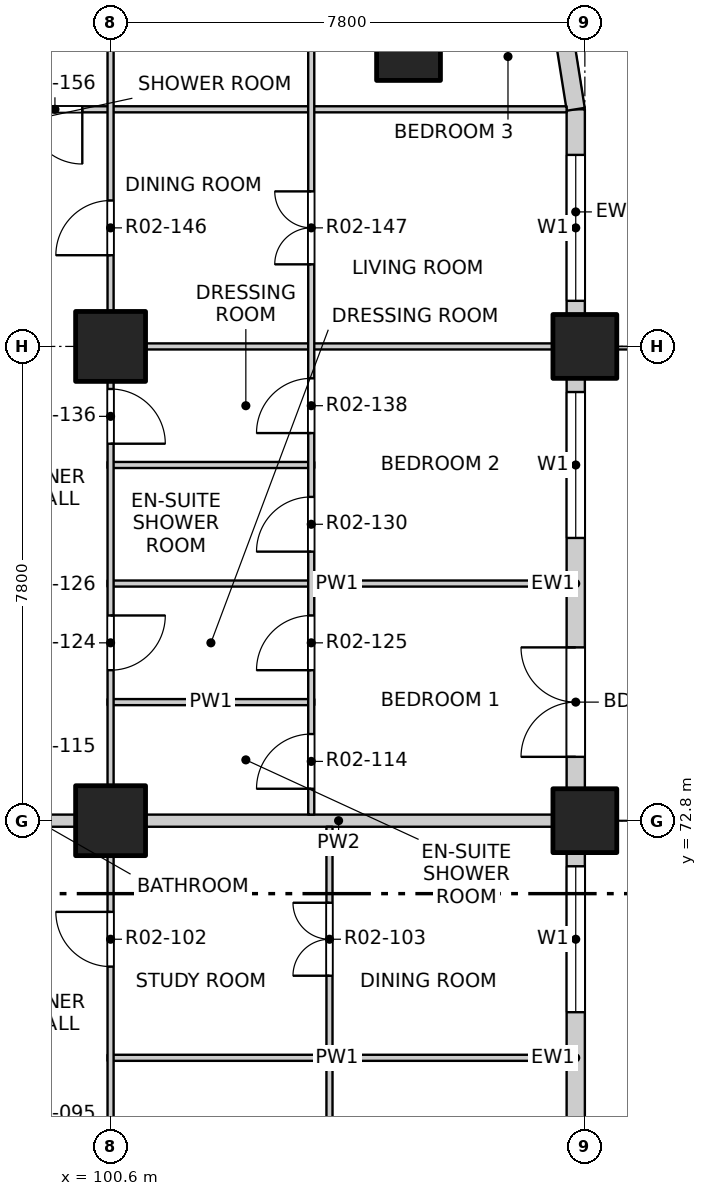
"""IFC4 building model, lengths in metres.
Left out: names, types, materials, properties, quantities, classifications, styles, units other than length and angle.
Written with IfcOpenShell. Run it as: python <this file> out.ifc"""

import sys

from ifc_helpers import new_model, si_unit, direction, frame, frame_2d, origin, origin_2d, place, context, subcontext, project, spatial, rectangle, extrude, element, fill, save


model = new_model("IFC4")
c1 = context("Model", 3, precision=1e-05, world=origin(), true_north=direction((0.0, 1.0)))
c2 = subcontext(c1, "Body", "Model", "MODEL_VIEW")
j1 = project(units=[si_unit("LENGTHUNIT", "METRE"), si_unit("PLANEANGLEUNIT", "RADIAN")], contexts=[c1])
p1 = place(None, origin())
s1 = spatial("IfcSite", under=j1, at=p1, CompositionType="ELEMENT")
p2 = place(p1, origin())
s2 = spatial("IfcBuilding", under=s1, at=p2, CompositionType="ELEMENT")
p3 = place(p2, frame((0.0, 0.0, 29.7)))
s3 = spatial("IfcBuildingStorey", under=s2, at=p3, CompositionType="ELEMENT", Elevation=29.7)
for number, where, z_axis, x_axis in (
    (1, (105.5, 85.5, -0.25), (0.0, 0.0, 1.0), (1.0, 0.0, 0.0)),
    (2, (108.4, 72.8, -0.25), (0.0, 0.0, 1.0), (1.0, 0.0, 0.0)),
    (3, (108.4, 80.6, -0.25), (0.0, 0.0, 1.0), (1.0, 0.0, 0.0)),
):
    element("IfcColumn", number, at=place(p3, frame(where, z_axis=z_axis, x_axis=x_axis)), inside=s3, PredefinedType="COLUMN", context=c2, shape_type="SweptSolid", body=[
        extrude(rectangle(XDim=1.05, YDim=1.05, at=origin_2d()), origin(), (0.0, 0.0, 1.0), 3.4),
    ])
for number, where, z_axis, x_axis in (
    (4, (100.6, 72.8, -0.25), (0.0, 0.0, 1.0), (1.0, 0.0, 0.0)),
    (5, (100.6, 80.6, -0.25), (0.0, 0.0, 1.0), (1.0, 0.0, 0.0)),
):
    element("IfcColumn", number, at=place(p3, frame(where, z_axis=z_axis, x_axis=x_axis)), inside=s3, PredefinedType="COLUMN", context=c2, shape_type="SweptSolid", body=[
        extrude(rectangle(XDim=1.15, YDim=1.15, at=origin_2d()), origin(), (0.0, 0.0, 1.0), 3.4),
    ])
p4 = place(p3, frame((108.25, 65.525, 0.0), z_axis=(0.0, 0.0, 1.0), x_axis=(0.0, 1.0, 0.0)))
e6 = element("IfcWall", 6, at=p4, inside=s3, PredefinedType="SOLIDWALL", context=c2, shape_type="SweptSolid", body=[
    extrude(rectangle(XDim=6.75, YDim=0.3, at=frame_2d((3.375, 0.0))), origin(), (0.0, 0.0, 1.0), 2.7),
])
p5 = place(p4, frame((0.525, 0.0, 0.0)))
e7 = element("IfcOpeningElement", 7, at=p5, cuts=e6, PredefinedType="OPENING", context=c2, shape_type="SweptSolid", body=[
    extrude(rectangle(XDim=1.8, YDim=2.4, at=frame_2d((0.9, 1.2))), frame((0.0, 0.16, 0.0), z_axis=(0.0, -1.0, 0.0), x_axis=(1.0, 0.0, 0.0)), (0.0, 0.0, 1.0), 0.32),
])
p6 = place(p4, frame((4.125, 0.0, 0.9)))
e8 = element("IfcOpeningElement", 8, at=p6, cuts=e6, PredefinedType="OPENING", context=c2, shape_type="SweptSolid", body=[
    extrude(rectangle(XDim=2.4, YDim=1.8, at=frame_2d((1.2, 0.9))), frame((0.0, 0.16, 0.0), z_axis=(0.0, -1.0, 0.0), x_axis=(1.0, 0.0, 0.0)), (0.0, 0.0, 1.0), 0.32),
])
p7 = place(p3, frame((108.25, 73.325, 0.0), z_axis=(0.0, 0.0, 1.0), x_axis=(0.0, 1.0, 0.0)))
e9 = element("IfcWall", 9, at=p7, inside=s3, PredefinedType="SOLIDWALL", context=c2, shape_type="SweptSolid", body=[
    extrude(rectangle(XDim=6.75, YDim=0.3, at=frame_2d((3.375, 0.0))), origin(), (0.0, 0.0, 1.0), 2.7),
])
p8 = place(p7, frame((0.525, 0.0, 0.0)))
e10 = element("IfcOpeningElement", 10, at=p8, cuts=e9, PredefinedType="OPENING", context=c2, shape_type="SweptSolid", body=[
    extrude(rectangle(XDim=1.8, YDim=2.4, at=frame_2d((0.9, 1.2))), frame((0.0, 0.16, 0.0), z_axis=(0.0, -1.0, 0.0), x_axis=(1.0, 0.0, 0.0)), (0.0, 0.0, 1.0), 0.32),
])
p9 = place(p7, frame((4.125, 0.0, 0.9)))
e11 = element("IfcOpeningElement", 11, at=p9, cuts=e9, PredefinedType="OPENING", context=c2, shape_type="SweptSolid", body=[
    extrude(rectangle(XDim=2.4, YDim=1.8, at=frame_2d((1.2, 0.9))), frame((0.0, 0.16, 0.0), z_axis=(0.0, -1.0, 0.0), x_axis=(1.0, 0.0, 0.0)), (0.0, 0.0, 1.0), 0.32),
])
p10 = place(p3, frame((108.25, 81.125, 0.0), z_axis=(0.0, 0.0, 1.0), x_axis=(0.0, 1.0, 0.0)))
e12 = element("IfcWall", 12, at=p10, inside=s3, PredefinedType="SOLIDWALL", context=c2, shape_type="SweptSolid", body=[
    extrude(rectangle(XDim=3.375, YDim=0.3, at=frame_2d((1.688, 0.0))), origin(), (0.0, 0.0, 1.0), 2.7),
])
p11 = place(p10, frame((0.225, 0.0, 0.9)))
e13 = element("IfcOpeningElement", 13, at=p11, cuts=e12, PredefinedType="OPENING", context=c2, shape_type="SweptSolid", body=[
    extrude(rectangle(XDim=2.4, YDim=1.8, at=frame_2d((1.2, 0.9))), frame((0.0, 0.16, 0.0), z_axis=(0.0, -1.0, 0.0), x_axis=(1.0, 0.0, 0.0)), (0.0, 0.0, 1.0), 0.32),
])
p12 = place(p3, frame((108.25, 84.5, 0.0), z_axis=(0.0, 0.0, 1.0), x_axis=(-0.156496880861, 0.987678452879, 0.0)))
e14 = element("IfcWall", 14, at=p12, inside=s3, PredefinedType="SOLIDWALL", context=c2, shape_type="SweptSolid", body=[
    extrude(rectangle(XDim=1.173, YDim=0.3, at=frame_2d((0.586, 0.0))), origin(), (0.0, 0.0, 1.0), 2.7),
])
p13 = place(p3, frame((100.55, 68.9, 0.0), z_axis=(0.0, 0.0, 1.0), x_axis=(1.0, 0.0, 0.0)))
e15 = element("IfcWall", 15, at=p13, inside=s3, PredefinedType="PARTITIONING", context=c2, shape_type="SweptSolid", body=[
    extrude(rectangle(XDim=7.55, YDim=0.1, at=frame_2d((3.775, 0.0))), origin(), (0.0, 0.0, 1.0), 3.15),
])
p14 = place(p3, frame((96.6, 72.8, 0.0), z_axis=(0.0, 0.0, 1.0), x_axis=(1.0, 0.0, 0.0)))
e16 = element("IfcWall", 16, at=p14, inside=s3, PredefinedType="PARTITIONING", context=c2, shape_type="SweptSolid", body=[
    extrude(rectangle(XDim=4.0, YDim=0.2, at=frame_2d((2.0, 0.0))), origin(), (0.0, 0.0, 1.0), 3.15),
])
p15 = place(p3, frame((100.6, 72.8, 0.0), z_axis=(0.0, 0.0, 1.0), x_axis=(1.0, 0.0, 0.0)))
e17 = element("IfcWall", 17, at=p15, inside=s3, PredefinedType="PARTITIONING", context=c2, shape_type="SweptSolid", body=[
    extrude(rectangle(XDim=7.5, YDim=0.2, at=frame_2d((3.75, 0.0))), origin(), (0.0, 0.0, 1.0), 2.55),
])
p16 = place(p3, frame((100.55, 74.75, 0.0), z_axis=(0.0, 0.0, 1.0), x_axis=(1.0, 0.0, 0.0)))
e18 = element("IfcWall", 18, at=p16, inside=s3, PredefinedType="PARTITIONING", context=c2, shape_type="SweptSolid", body=[
    extrude(rectangle(XDim=3.4, YDim=0.1, at=frame_2d((1.7, 0.0))), origin(), (0.0, 0.0, 1.0), 3.15),
])
p17 = place(p3, frame((100.55, 76.7, 0.0), z_axis=(0.0, 0.0, 1.0), x_axis=(1.0, 0.0, 0.0)))
e19 = element("IfcWall", 19, at=p17, inside=s3, PredefinedType="PARTITIONING", context=c2, shape_type="SweptSolid", body=[
    extrude(rectangle(XDim=7.55, YDim=0.1, at=frame_2d((3.775, 0.0))), origin(), (0.0, 0.0, 1.0), 3.15),
])
p18 = place(p3, frame((100.55, 78.65, 0.0), z_axis=(0.0, 0.0, 1.0), x_axis=(1.0, 0.0, 0.0)))
e20 = element("IfcWall", 20, at=p18, inside=s3, PredefinedType="PARTITIONING", context=c2, shape_type="SweptSolid", body=[
    extrude(rectangle(XDim=3.4, YDim=0.1, at=frame_2d((1.7, 0.0))), origin(), (0.0, 0.0, 1.0), 3.15),
])
p19 = place(p3, frame((100.55, 80.6, 0.0), z_axis=(0.0, 0.0, 1.0), x_axis=(1.0, 0.0, 0.0)))
e21 = element("IfcWall", 21, at=p19, inside=s3, PredefinedType="PARTITIONING", context=c2, shape_type="SweptSolid", body=[
    extrude(rectangle(XDim=7.55, YDim=0.1, at=frame_2d((3.775, 0.0))), origin(), (0.0, 0.0, 1.0), 2.55),
])
p20 = place(p3, frame((96.6, 84.5, 0.0), z_axis=(0.0, 0.0, 1.0), x_axis=(1.0, 0.0, 0.0)))
e22 = element("IfcWall", 22, at=p20, inside=s3, PredefinedType="PARTITIONING", context=c2, shape_type="SweptSolid", body=[
    extrude(rectangle(XDim=11.5, YDim=0.1, at=frame_2d((5.75, 0.0))), origin(), (0.0, 0.0, 1.0), 3.15),
])
p21 = place(p20, frame((2.635, 0.0, 0.0)))
e23 = element("IfcOpeningElement", 23, at=p21, cuts=e22, PredefinedType="OPENING", context=c2, shape_type="SweptSolid", body=[
    extrude(rectangle(XDim=0.9, YDim=2.1, at=frame_2d((0.45, 1.05))), frame((0.0, 0.06, 0.0), z_axis=(0.0, -1.0, 0.0), x_axis=(1.0, 0.0, 0.0)), (0.0, 0.0, 1.0), 0.12),
])
p22 = place(p3, frame((100.6, 49.4, 0.0), z_axis=(0.0, 0.0, 1.0), x_axis=(0.0, 1.0, 0.0)))
e24 = element("IfcWall", 24, at=p22, inside=s3, PredefinedType="PARTITIONING", context=c2, shape_type="SweptSolid", body=[
    extrude(rectangle(XDim=31.2, YDim=0.1, at=frame_2d((15.6, 0.0))), origin(), (0.0, 0.0, 1.0), 3.15),
])
p23 = place(p22, frame((2.475, 0.0, 0.0)))
e25 = element("IfcOpeningElement", 25, at=p23, cuts=e24, PredefinedType="OPENING", context=c2, shape_type="SweptSolid", body=[
    extrude(rectangle(XDim=0.9, YDim=2.1, at=frame_2d((0.45, 1.05))), frame((0.0, 0.06, 0.0), z_axis=(0.0, -1.0, 0.0), x_axis=(1.0, 0.0, 0.0)), (0.0, 0.0, 1.0), 0.12),
])
p24 = place(p22, frame((5.4, 0.0, 0.0)))
e26 = element("IfcOpeningElement", 26, at=p24, cuts=e24, PredefinedType="OPENING", context=c2, shape_type="SweptSolid", body=[
    extrude(rectangle(XDim=0.9, YDim=2.1, at=frame_2d((0.45, 1.05))), frame((0.0, 0.06, 0.0), z_axis=(0.0, -1.0, 0.0), x_axis=(1.0, 0.0, 0.0)), (0.0, 0.0, 1.0), 0.12),
])
p25 = place(p22, frame((10.275, 0.0, 0.0)))
e27 = element("IfcOpeningElement", 27, at=p25, cuts=e24, PredefinedType="OPENING", context=c2, shape_type="SweptSolid", body=[
    extrude(rectangle(XDim=0.9, YDim=2.1, at=frame_2d((0.45, 1.05))), frame((0.0, 0.06, 0.0), z_axis=(0.0, -1.0, 0.0), x_axis=(1.0, 0.0, 0.0)), (0.0, 0.0, 1.0), 0.12),
])
p26 = place(p22, frame((14.0, 0.0, 0.0)))
e28 = element("IfcOpeningElement", 28, at=p26, cuts=e24, PredefinedType="OPENING", context=c2, shape_type="SweptSolid", body=[
    extrude(rectangle(XDim=0.9, YDim=2.1, at=frame_2d((0.45, 1.05))), frame((0.0, 0.06, 0.0), z_axis=(0.0, -1.0, 0.0), x_axis=(1.0, 0.0, 0.0)), (0.0, 0.0, 1.0), 0.12),
])
p27 = place(p22, frame((17.1, 0.0, 0.0)))
e29 = element("IfcOpeningElement", 29, at=p27, cuts=e24, PredefinedType="OPENING", context=c2, shape_type="SweptSolid", body=[
    extrude(rectangle(XDim=0.9, YDim=2.1, at=frame_2d((0.45, 1.05))), frame((0.0, 0.06, 0.0), z_axis=(0.0, -1.0, 0.0), x_axis=(1.0, 0.0, 0.0)), (0.0, 0.0, 1.0), 0.12),
])
p28 = place(p22, frame((21.0, 0.0, 0.0)))
e30 = element("IfcOpeningElement", 30, at=p28, cuts=e24, PredefinedType="OPENING", context=c2, shape_type="SweptSolid", body=[
    extrude(rectangle(XDim=0.9, YDim=2.1, at=frame_2d((0.45, 1.05))), frame((0.0, 0.06, 0.0), z_axis=(0.0, -1.0, 0.0), x_axis=(1.0, 0.0, 0.0)), (0.0, 0.0, 1.0), 0.12),
])
p29 = place(p22, frame((25.875, 0.0, 0.0)))
e31 = element("IfcOpeningElement", 31, at=p29, cuts=e24, PredefinedType="OPENING", context=c2, shape_type="SweptSolid", body=[
    extrude(rectangle(XDim=0.9, YDim=2.1, at=frame_2d((0.45, 1.05))), frame((0.0, 0.06, 0.0), z_axis=(0.0, -1.0, 0.0), x_axis=(1.0, 0.0, 0.0)), (0.0, 0.0, 1.0), 0.12),
])
p30 = place(p22, frame((29.6, 0.0, 0.0)))
e32 = element("IfcOpeningElement", 32, at=p30, cuts=e24, PredefinedType="OPENING", context=c2, shape_type="SweptSolid", body=[
    extrude(rectangle(XDim=0.9, YDim=2.1, at=frame_2d((0.45, 1.05))), frame((0.0, 0.06, 0.0), z_axis=(0.0, -1.0, 0.0), x_axis=(1.0, 0.0, 0.0)), (0.0, 0.0, 1.0), 0.12),
])
p31 = place(p3, frame((100.6, 80.6, 0.0), z_axis=(0.0, 0.0, 1.0), x_axis=(0.0, 1.0, 0.0)))
e33 = element("IfcWall", 33, at=p31, inside=s3, PredefinedType="PARTITIONING", context=c2, shape_type="SweptSolid", body=[
    extrude(rectangle(XDim=7.5, YDim=0.1, at=frame_2d((3.75, 0.0))), origin(), (0.0, 0.0, 1.0), 2.55),
])
p32 = place(p31, frame((1.5, 0.0, 0.0)))
e34 = element("IfcOpeningElement", 34, at=p32, cuts=e33, PredefinedType="OPENING", context=c2, shape_type="SweptSolid", body=[
    extrude(rectangle(XDim=0.9, YDim=2.1, at=frame_2d((0.45, 1.05))), frame((0.0, 0.06, 0.0), z_axis=(0.0, -1.0, 0.0), x_axis=(1.0, 0.0, 0.0)), (0.0, 0.0, 1.0), 0.12),
])
p33 = place(p31, frame((5.4, 0.0, 0.0)))
e35 = element("IfcOpeningElement", 35, at=p33, cuts=e33, PredefinedType="OPENING", context=c2, shape_type="SweptSolid", body=[
    extrude(rectangle(XDim=0.9, YDim=2.1, at=frame_2d((0.45, 1.05))), frame((0.0, 0.06, 0.0), z_axis=(0.0, -1.0, 0.0), x_axis=(1.0, 0.0, 0.0)), (0.0, 0.0, 1.0), 0.12),
])
p34 = place(p3, frame((103.9, 72.9, 0.0), z_axis=(0.0, 0.0, 1.0), x_axis=(0.0, 1.0, 0.0)))
e36 = element("IfcWall", 36, at=p34, inside=s3, PredefinedType="PARTITIONING", context=c2, shape_type="SweptSolid", body=[
    extrude(rectangle(XDim=15.2, YDim=0.1, at=frame_2d((7.6, 0.0))), origin(), (0.0, 0.0, 1.0), 3.15),
])
p35 = place(p34, frame((0.425, 0.0, 0.0)))
e37 = element("IfcOpeningElement", 37, at=p35, cuts=e36, PredefinedType="OPENING", context=c2, shape_type="SweptSolid", body=[
    extrude(rectangle(XDim=0.9, YDim=2.1, at=frame_2d((0.45, 1.05))), frame((0.0, 0.06, 0.0), z_axis=(0.0, -1.0, 0.0), x_axis=(1.0, 0.0, 0.0)), (0.0, 0.0, 1.0), 0.12),
])
p36 = place(p34, frame((2.375, 0.0, 0.0)))
e38 = element("IfcOpeningElement", 38, at=p36, cuts=e36, PredefinedType="OPENING", context=c2, shape_type="SweptSolid", body=[
    extrude(rectangle(XDim=0.9, YDim=2.1, at=frame_2d((0.45, 1.05))), frame((0.0, 0.06, 0.0), z_axis=(0.0, -1.0, 0.0), x_axis=(1.0, 0.0, 0.0)), (0.0, 0.0, 1.0), 0.12),
])
p37 = place(p34, frame((4.325, 0.0, 0.0)))
e39 = element("IfcOpeningElement", 39, at=p37, cuts=e36, PredefinedType="OPENING", context=c2, shape_type="SweptSolid", body=[
    extrude(rectangle(XDim=0.9, YDim=2.1, at=frame_2d((0.45, 1.05))), frame((0.0, 0.06, 0.0), z_axis=(0.0, -1.0, 0.0), x_axis=(1.0, 0.0, 0.0)), (0.0, 0.0, 1.0), 0.12),
])
p38 = place(p34, frame((6.275, 0.0, 0.0)))
e40 = element("IfcOpeningElement", 40, at=p38, cuts=e36, PredefinedType="OPENING", context=c2, shape_type="SweptSolid", body=[
    extrude(rectangle(XDim=0.9, YDim=2.1, at=frame_2d((0.45, 1.05))), frame((0.0, 0.06, 0.0), z_axis=(0.0, -1.0, 0.0), x_axis=(1.0, 0.0, 0.0)), (0.0, 0.0, 1.0), 0.12),
])
p39 = place(p34, frame((9.05, 0.0, 0.0)))
e41 = element("IfcOpeningElement", 41, at=p39, cuts=e36, PredefinedType="OPENING", context=c2, shape_type="SweptSolid", body=[
    extrude(rectangle(XDim=1.2, YDim=2.1, at=frame_2d((0.6, 1.05))), frame((0.0, 0.06, 0.0), z_axis=(0.0, -1.0, 0.0), x_axis=(1.0, 0.0, 0.0)), (0.0, 0.0, 1.0), 0.12),
])
p40 = place(p34, frame((12.95, 0.0, 0.0)))
e42 = element("IfcOpeningElement", 42, at=p40, cuts=e36, PredefinedType="OPENING", context=c2, shape_type="SweptSolid", body=[
    extrude(rectangle(XDim=1.2, YDim=2.1, at=frame_2d((0.6, 1.05))), frame((0.0, 0.06, 0.0), z_axis=(0.0, -1.0, 0.0), x_axis=(1.0, 0.0, 0.0)), (0.0, 0.0, 1.0), 0.12),
])
p41 = place(p3, frame((104.2, 61.2, 0.0), z_axis=(0.0, 0.0, 1.0), x_axis=(0.0, 1.0, 0.0)))
e43 = element("IfcWall", 43, at=p41, inside=s3, PredefinedType="PARTITIONING", context=c2, shape_type="SweptSolid", body=[
    extrude(rectangle(XDim=11.5, YDim=0.1, at=frame_2d((5.75, 0.0))), origin(), (0.0, 0.0, 1.0), 3.15),
])
p42 = place(p41, frame((0.425, 0.0, 0.0)))
e44 = element("IfcOpeningElement", 44, at=p42, cuts=e43, PredefinedType="OPENING", context=c2, shape_type="SweptSolid", body=[
    extrude(rectangle(XDim=0.9, YDim=2.1, at=frame_2d((0.45, 1.05))), frame((0.0, 0.06, 0.0), z_axis=(0.0, -1.0, 0.0), x_axis=(1.0, 0.0, 0.0)), (0.0, 0.0, 1.0), 0.12),
])
p43 = place(p41, frame((2.375, 0.0, 0.0)))
e45 = element("IfcOpeningElement", 45, at=p43, cuts=e43, PredefinedType="OPENING", context=c2, shape_type="SweptSolid", body=[
    extrude(rectangle(XDim=0.9, YDim=2.1, at=frame_2d((0.45, 1.05))), frame((0.0, 0.06, 0.0), z_axis=(0.0, -1.0, 0.0), x_axis=(1.0, 0.0, 0.0)), (0.0, 0.0, 1.0), 0.12),
])
p44 = place(p41, frame((5.15, 0.0, 0.0)))
e46 = element("IfcOpeningElement", 46, at=p44, cuts=e43, PredefinedType="OPENING", context=c2, shape_type="SweptSolid", body=[
    extrude(rectangle(XDim=1.2, YDim=2.1, at=frame_2d((0.6, 1.05))), frame((0.0, 0.06, 0.0), z_axis=(0.0, -1.0, 0.0), x_axis=(1.0, 0.0, 0.0)), (0.0, 0.0, 1.0), 0.12),
])
p45 = place(p41, frame((9.05, 0.0, 0.0)))
e47 = element("IfcOpeningElement", 47, at=p45, cuts=e43, PredefinedType="OPENING", context=c2, shape_type="SweptSolid", body=[
    extrude(rectangle(XDim=1.2, YDim=2.1, at=frame_2d((0.6, 1.05))), frame((0.0, 0.06, 0.0), z_axis=(0.0, -1.0, 0.0), x_axis=(1.0, 0.0, 0.0)), (0.0, 0.0, 1.0), 0.12),
])
p46 = place(p6, origin())
e48 = element("IfcWindow", 48, at=p46, inside=s3, PartitioningType="DOUBLE_PANEL_VERTICAL", PredefinedType="WINDOW", context=c2, shape_type="SweptSolid", body=[
    extrude(rectangle(XDim=2.4, YDim=1.8, at=frame_2d((1.2, 0.9))), frame((0.0, 0.03, 0.0), z_axis=(0.0, -1.0, 0.0), x_axis=(1.0, 0.0, 0.0)), (0.0, 0.0, 1.0), 0.06),
])
fill(e8, e48)
p47 = place(p8, origin())
e49 = element("IfcDoor", 49, at=p47, inside=s3, OperationType="DOUBLE_DOOR_SINGLE_SWING", PredefinedType="DOOR", context=c2, shape_type="SweptSolid", body=[
    extrude(rectangle(XDim=1.8, YDim=2.4, at=frame_2d((0.9, 1.2))), frame((0.0, 0.025, 0.0), z_axis=(0.0, -1.0, 0.0), x_axis=(1.0, 0.0, 0.0)), (0.0, 0.0, 1.0), 0.05),
])
fill(e10, e49)
p48 = place(p9, origin())
e50 = element("IfcWindow", 50, at=p48, inside=s3, PartitioningType="DOUBLE_PANEL_VERTICAL", PredefinedType="WINDOW", context=c2, shape_type="SweptSolid", body=[
    extrude(rectangle(XDim=2.4, YDim=1.8, at=frame_2d((1.2, 0.9))), frame((0.0, 0.03, 0.0), z_axis=(0.0, -1.0, 0.0), x_axis=(1.0, 0.0, 0.0)), (0.0, 0.0, 1.0), 0.06),
])
fill(e11, e50)
p49 = place(p11, origin())
e51 = element("IfcWindow", 51, at=p49, inside=s3, PartitioningType="DOUBLE_PANEL_VERTICAL", PredefinedType="WINDOW", context=c2, shape_type="SweptSolid", body=[
    extrude(rectangle(XDim=2.4, YDim=1.8, at=frame_2d((1.2, 0.9))), frame((0.0, 0.03, 0.0), z_axis=(0.0, -1.0, 0.0), x_axis=(1.0, 0.0, 0.0)), (0.0, 0.0, 1.0), 0.06),
])
fill(e13, e51)
p50 = place(p28, origin())
e52 = element("IfcDoor", 52, at=p50, inside=s3, OperationType="SINGLE_SWING_RIGHT", PredefinedType="DOOR", context=c2, shape_type="SweptSolid", body=[
    extrude(rectangle(XDim=0.9, YDim=2.1, at=frame_2d((0.45, 1.05))), frame((0.0, 0.025, 0.0), z_axis=(0.0, -1.0, 0.0), x_axis=(1.0, 0.0, 0.0)), (0.0, 0.0, 1.0), 0.05),
])
fill(e30, e52)
p51 = place(p45, origin())
e53 = element("IfcDoor", 53, at=p51, inside=s3, OperationType="DOUBLE_DOOR_SINGLE_SWING", PredefinedType="DOOR", context=c2, shape_type="SweptSolid", body=[
    extrude(rectangle(XDim=1.2, YDim=2.1, at=frame_2d((0.6, 1.05))), frame((0.0, 0.025, 0.0), z_axis=(0.0, -1.0, 0.0), x_axis=(1.0, 0.0, 0.0)), (0.0, 0.0, 1.0), 0.05),
])
fill(e47, e53)
p52 = place(p35, origin())
e54 = element("IfcDoor", 54, at=p52, inside=s3, OperationType="SINGLE_SWING_LEFT", PredefinedType="DOOR", context=c2, shape_type="SweptSolid", body=[
    extrude(rectangle(XDim=0.9, YDim=2.1, at=frame_2d((0.45, 1.05))), frame((0.0, 0.025, 0.0), z_axis=(0.0, -1.0, 0.0), x_axis=(1.0, 0.0, 0.0)), (0.0, 0.0, 1.0), 0.05),
])
fill(e37, e54)
p53 = place(p29, origin())
e55 = element("IfcDoor", 55, at=p53, inside=s3, OperationType="SINGLE_SWING_LEFT", PredefinedType="DOOR", context=c2, shape_type="SweptSolid", body=[
    extrude(rectangle(XDim=0.9, YDim=2.1, at=frame_2d((0.45, 1.05))), frame((0.0, 0.025, 0.0), z_axis=(0.0, -1.0, 0.0), x_axis=(1.0, 0.0, 0.0)), (0.0, 0.0, 1.0), 0.05),
])
fill(e31, e55)
p54 = place(p36, origin())
e56 = element("IfcDoor", 56, at=p54, inside=s3, OperationType="SINGLE_SWING_LEFT", PredefinedType="DOOR", context=c2, shape_type="SweptSolid", body=[
    extrude(rectangle(XDim=0.9, YDim=2.1, at=frame_2d((0.45, 1.05))), frame((0.0, 0.025, 0.0), z_axis=(0.0, -1.0, 0.0), x_axis=(1.0, 0.0, 0.0)), (0.0, 0.0, 1.0), 0.05),
])
fill(e38, e56)
p55 = place(p37, origin())
e57 = element("IfcDoor", 57, at=p55, inside=s3, OperationType="SINGLE_SWING_LEFT", PredefinedType="DOOR", context=c2, shape_type="SweptSolid", body=[
    extrude(rectangle(XDim=0.9, YDim=2.1, at=frame_2d((0.45, 1.05))), frame((0.0, 0.025, 0.0), z_axis=(0.0, -1.0, 0.0), x_axis=(1.0, 0.0, 0.0)), (0.0, 0.0, 1.0), 0.05),
])
fill(e39, e57)
p56 = place(p30, origin())
e58 = element("IfcDoor", 58, at=p56, inside=s3, OperationType="SINGLE_SWING_RIGHT", PredefinedType="DOOR", context=c2, shape_type="SweptSolid", body=[
    extrude(rectangle(XDim=0.9, YDim=2.1, at=frame_2d((0.45, 1.05))), frame((0.0, 0.025, 0.0), z_axis=(0.0, -1.0, 0.0), x_axis=(1.0, 0.0, 0.0)), (0.0, 0.0, 1.0), 0.05),
])
fill(e32, e58)
p57 = place(p38, origin())
e59 = element("IfcDoor", 59, at=p57, inside=s3, OperationType="SINGLE_SWING_LEFT", PredefinedType="DOOR", context=c2, shape_type="SweptSolid", body=[
    extrude(rectangle(XDim=0.9, YDim=2.1, at=frame_2d((0.45, 1.05))), frame((0.0, 0.025, 0.0), z_axis=(0.0, -1.0, 0.0), x_axis=(1.0, 0.0, 0.0)), (0.0, 0.0, 1.0), 0.05),
])
fill(e40, e59)
p58 = place(p32, origin())
e60 = element("IfcDoor", 60, at=p58, inside=s3, OperationType="SINGLE_SWING_LEFT", PredefinedType="DOOR", context=c2, shape_type="SweptSolid", body=[
    extrude(rectangle(XDim=0.9, YDim=2.1, at=frame_2d((0.45, 1.05))), frame((0.0, 0.025, 0.0), z_axis=(0.0, -1.0, 0.0), x_axis=(1.0, 0.0, 0.0)), (0.0, 0.0, 1.0), 0.05),
])
fill(e34, e60)
p59 = place(p39, origin())
e61 = element("IfcDoor", 61, at=p59, inside=s3, OperationType="DOUBLE_DOOR_SINGLE_SWING", PredefinedType="DOOR", context=c2, shape_type="SweptSolid", body=[
    extrude(rectangle(XDim=1.2, YDim=2.1, at=frame_2d((0.6, 1.05))), frame((0.0, 0.025, 0.0), z_axis=(0.0, -1.0, 0.0), x_axis=(1.0, 0.0, 0.0)), (0.0, 0.0, 1.0), 0.05),
])
fill(e41, e61)
p60 = place(p21, origin())
e62 = element("IfcDoor", 62, at=p60, inside=s3, OperationType="SINGLE_SWING_LEFT", PredefinedType="DOOR", context=c2, shape_type="SweptSolid", body=[
    extrude(rectangle(XDim=0.9, YDim=2.1, at=frame_2d((0.45, 1.05))), frame((0.0, 0.025, 0.0), z_axis=(0.0, -1.0, 0.0), x_axis=(1.0, 0.0, 0.0)), (0.0, 0.0, 1.0), 0.05),
])
fill(e23, e62)
save(model, sys.argv[1])
